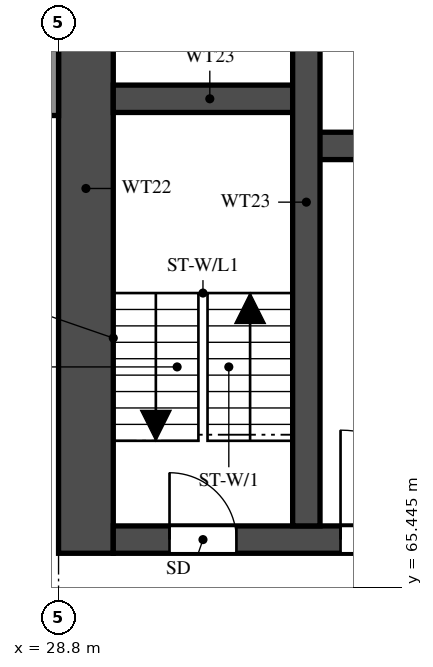
"""IFC4 building model, lengths in metres.
Left out: names, types, materials, properties, quantities, classifications, styles, units other than length and angle.
Written with IfcOpenShell. Run it as: python <this file> out.ifc"""

import sys

from ifc_helpers import new_model, si_unit, direction, frame, frame_2d, origin, place, context, subcontext, project, spatial, rectangle, extrude, element, fill, save


model = new_model("IFC4")
c1 = context("Model", 3, precision=1e-05, world=origin(), true_north=direction((0.0, 1.0)))
c2 = subcontext(c1, "Body", "Model", "MODEL_VIEW")
j1 = project(units=[si_unit("LENGTHUNIT", "METRE"), si_unit("PLANEANGLEUNIT", "RADIAN")], contexts=[c1])
p1 = place(None, origin())
s1 = spatial("IfcSite", under=j1, at=p1, CompositionType="ELEMENT")
p2 = place(p1, origin())
s2 = spatial("IfcBuilding", under=s1, at=p2, CompositionType="ELEMENT")
p3 = place(p2, frame((0.0, 0.0, 104.0)))
s3 = spatial("IfcBuildingStorey", under=s2, at=p3, CompositionType="ELEMENT", Elevation=104.0)
p4 = place(p3, frame((29.25, 66.0, 0.0), z_axis=(0.0, 0.0, 1.0), x_axis=(0.0, 1.0, 0.0)))
e1 = element("IfcWall", 1, at=p4, inside=s3, PredefinedType="SHEAR", context=c2, shape_type="SweptSolid", body=[
    extrude(rectangle(XDim=12.0, YDim=0.9, at=frame_2d((6.0, 0.0))), origin(), (0.0, 0.0, 1.0), 3.1),
])
p5 = place(p3, frame((29.7, 66.225, 0.0), z_axis=(0.0, 0.0, 1.0), x_axis=(1.0, 0.0, 0.0)))
e2 = element("IfcWall", 2, at=p5, inside=s3, PredefinedType="SHEAR", context=c2, shape_type="SweptSolid", body=[
    extrude(rectangle(XDim=41.4, YDim=0.45, at=frame_2d((20.7, 0.0))), origin(), (0.0, 0.0, 1.0), 3.1),
])
p6 = place(p5, frame((0.925, 0.0, 0.0)))
e3 = element("IfcOpeningElement", 3, at=p6, cuts=e2, PredefinedType="OPENING", context=c2, shape_type="SweptSolid", body=[
    extrude(rectangle(XDim=1.1, YDim=2.1, at=frame_2d((0.55, 1.05))), frame((0.0, 0.235, 0.0), z_axis=(0.0, -1.0, 0.0), x_axis=(1.0, 0.0, 0.0)), (0.0, 0.0, 1.0), 0.47),
])
p7 = place(p5, frame((3.738, 0.0, 0.0)))
e4 = element("IfcOpeningElement", 4, at=p7, cuts=e2, PredefinedType="OPENING", context=c2, shape_type="SweptSolid", body=[
    extrude(rectangle(XDim=1.8, YDim=2.1, at=frame_2d((0.9, 1.05))), frame((0.0, 0.235, 0.0), z_axis=(0.0, -1.0, 0.0), x_axis=(1.0, 0.0, 0.0)), (0.0, 0.0, 1.0), 0.47),
])
p8 = place(p3, frame((32.875, 72.7, 0.0), z_axis=(0.0, 0.0, 1.0), x_axis=(1.0, 0.0, 0.0)))
e5 = element("IfcWall", 5, at=p8, inside=s3, PredefinedType="SHEAR", context=c2, shape_type="SweptSolid", body=[
    extrude(rectangle(XDim=35.05, YDim=0.45, at=frame_2d((17.525, 0.0))), origin(), (0.0, 0.0, 1.0), 3.1),
])
p9 = place(p8, frame((19.8, 0.0, 0.0)))
e6 = element("IfcOpeningElement", 6, at=p9, cuts=e5, PredefinedType="OPENING", context=c2, shape_type="SweptSolid", body=[
    extrude(rectangle(XDim=1.1, YDim=2.1, at=frame_2d((0.55, 1.05))), frame((0.0, 0.235, 0.0), z_axis=(0.0, -1.0, 0.0), x_axis=(1.0, 0.0, 0.0)), (0.0, 0.0, 1.0), 0.47),
])
p10 = place(p8, frame((27.65, 0.0, 0.0)))
e7 = element("IfcOpeningElement", 7, at=p10, cuts=e5, PredefinedType="OPENING", context=c2, shape_type="SweptSolid", body=[
    extrude(rectangle(XDim=1.1, YDim=2.1, at=frame_2d((0.55, 1.05))), frame((0.0, 0.235, 0.0), z_axis=(0.0, -1.0, 0.0), x_axis=(1.0, 0.0, 0.0)), (0.0, 0.0, 1.0), 0.47),
])
p11 = place(p8, frame((30.25, 0.0, 0.0)))
e8 = element("IfcOpeningElement", 8, at=p11, cuts=e5, PredefinedType="OPENING", context=c2, shape_type="SweptSolid", body=[
    extrude(rectangle(XDim=1.1, YDim=2.1, at=frame_2d((0.55, 1.05))), frame((0.0, 0.235, 0.0), z_axis=(0.0, -1.0, 0.0), x_axis=(1.0, 0.0, 0.0)), (0.0, 0.0, 1.0), 0.47),
])
p12 = place(p8, frame((3.75, 0.0, 0.0)))
e9 = element("IfcOpeningElement", 9, at=p12, cuts=e5, PredefinedType="OPENING", context=c2, shape_type="SweptSolid", body=[
    extrude(rectangle(XDim=1.1, YDim=2.1, at=frame_2d((0.55, 1.05))), frame((0.0, 0.235, 0.0), z_axis=(0.0, -1.0, 0.0), x_axis=(1.0, 0.0, 0.0)), (0.0, 0.0, 1.0), 0.47),
])
p13 = place(p8, frame((6.5, 0.0, 0.0)))
e10 = element("IfcOpeningElement", 10, at=p13, cuts=e5, PredefinedType="OPENING", context=c2, shape_type="SweptSolid", body=[
    extrude(rectangle(XDim=1.1, YDim=2.1, at=frame_2d((0.55, 1.05))), frame((0.0, 0.235, 0.0), z_axis=(0.0, -1.0, 0.0), x_axis=(1.0, 0.0, 0.0)), (0.0, 0.0, 1.0), 0.47),
])
p14 = place(p8, frame((9.25, 0.0, 0.0)))
e11 = element("IfcOpeningElement", 11, at=p14, cuts=e5, PredefinedType="OPENING", context=c2, shape_type="SweptSolid", body=[
    extrude(rectangle(XDim=1.1, YDim=2.1, at=frame_2d((0.55, 1.05))), frame((0.0, 0.235, 0.0), z_axis=(0.0, -1.0, 0.0), x_axis=(1.0, 0.0, 0.0)), (0.0, 0.0, 1.0), 0.47),
])
p15 = place(p8, frame((12.0, 0.0, 0.0)))
e12 = element("IfcOpeningElement", 12, at=p15, cuts=e5, PredefinedType="OPENING", context=c2, shape_type="SweptSolid", body=[
    extrude(rectangle(XDim=1.1, YDim=2.1, at=frame_2d((0.55, 1.05))), frame((0.0, 0.235, 0.0), z_axis=(0.0, -1.0, 0.0), x_axis=(1.0, 0.0, 0.0)), (0.0, 0.0, 1.0), 0.47),
])
p16 = place(p8, frame((14.75, 0.0, 0.0)))
e13 = element("IfcOpeningElement", 13, at=p16, cuts=e5, PredefinedType="OPENING", context=c2, shape_type="SweptSolid", body=[
    extrude(rectangle(XDim=1.1, YDim=2.1, at=frame_2d((0.55, 1.05))), frame((0.0, 0.235, 0.0), z_axis=(0.0, -1.0, 0.0), x_axis=(1.0, 0.0, 0.0)), (0.0, 0.0, 1.0), 0.47),
])
p17 = place(p8, frame((17.5, 0.0, 0.0)))
e14 = element("IfcOpeningElement", 14, at=p17, cuts=e5, PredefinedType="OPENING", context=c2, shape_type="SweptSolid", body=[
    extrude(rectangle(XDim=1.1, YDim=2.1, at=frame_2d((0.55, 1.05))), frame((0.0, 0.235, 0.0), z_axis=(0.0, -1.0, 0.0), x_axis=(1.0, 0.0, 0.0)), (0.0, 0.0, 1.0), 0.47),
])
p18 = place(p8, frame((0.913, 0.0, 0.0)))
e15 = element("IfcOpeningElement", 15, at=p18, cuts=e5, PredefinedType="OPENING", context=c2, shape_type="SweptSolid", body=[
    extrude(rectangle(XDim=1.1, YDim=2.1, at=frame_2d((0.55, 1.05))), frame((0.0, 0.235, 0.0), z_axis=(0.0, -1.0, 0.0), x_axis=(1.0, 0.0, 0.0)), (0.0, 0.0, 1.0), 0.47),
])
p19 = place(p3, frame((29.7, 73.475, 0.0), z_axis=(0.0, 0.0, 1.0), x_axis=(1.0, 0.0, 0.0)))
e16 = element("IfcWall", 16, at=p19, inside=s3, PredefinedType="SHEAR", context=c2, shape_type="SweptSolid", body=[
    extrude(rectangle(XDim=3.175, YDim=0.45, at=frame_2d((1.587, 0.0))), origin(), (0.0, 0.0, 1.0), 3.1),
])
p20 = place(p3, frame((32.875, 66.45, 0.0), z_axis=(0.0, 0.0, 1.0), x_axis=(0.0, 1.0, 0.0)))
e17 = element("IfcWall", 17, at=p20, inside=s3, PredefinedType="SHEAR", context=c2, shape_type="SweptSolid", body=[
    extrude(rectangle(XDim=10.65, YDim=0.45, at=frame_2d((5.325, 0.0))), origin(), (0.0, 0.0, 1.0), 3.1),
])
p21 = place(p3, frame((28.7, 73.2, 0.0), z_axis=(0.0, 0.0, 1.0), x_axis=(0.0, 1.0, 0.0)))
e18 = element("IfcWall", 18, at=p21, inside=s3, PredefinedType="SOLIDWALL", context=c2, shape_type="SweptSolid", body=[
    extrude(rectangle(XDim=4.8, YDim=0.2, at=frame_2d((2.4, 0.0))), origin(), (0.0, 0.0, 1.0), 3.1),
])
p22 = place(p6, origin())
e19 = element("IfcDoor", 19, at=p22, inside=s3, OperationType="SINGLE_SWING_LEFT", PredefinedType="DOOR", context=c2, shape_type="SweptSolid", body=[
    extrude(rectangle(XDim=1.1, YDim=2.1, at=frame_2d((0.55, 1.05))), frame((0.0, 0.025, 0.0), z_axis=(0.0, -1.0, 0.0), x_axis=(1.0, 0.0, 0.0)), (0.0, 0.0, 1.0), 0.05),
])
fill(e3, e19)
p23 = place(p7, origin())
e20 = element("IfcDoor", 20, at=p23, inside=s3, OperationType="DOUBLE_DOOR_SINGLE_SWING", PredefinedType="DOOR", context=c2, shape_type="SweptSolid", body=[
    extrude(rectangle(XDim=1.8, YDim=2.1, at=frame_2d((0.9, 1.05))), frame((0.0, 0.025, 0.0), z_axis=(0.0, -1.0, 0.0), x_axis=(1.0, 0.0, 0.0)), (0.0, 0.0, 1.0), 0.05),
])
fill(e4, e20)
save(model, sys.argv[1])
